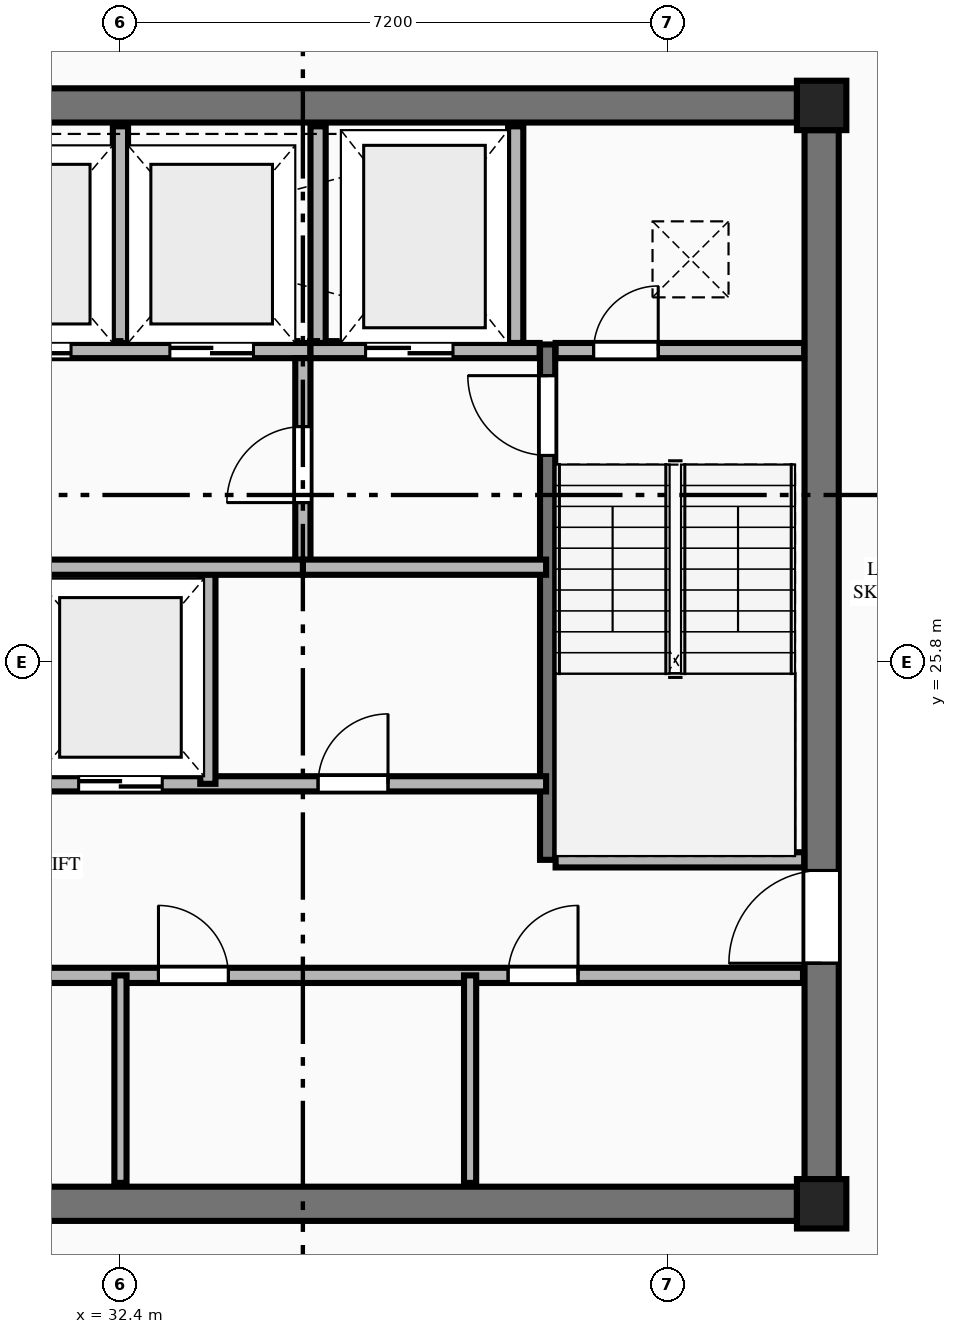
"""IFC4 building model, lengths in metres.
Left out: names, types, materials, properties, quantities, classifications, styles, units other than length and angle.
Written with IfcOpenShell. Run it as: python <this file> out.ifc"""

import sys

from ifc_helpers import new_model, si_unit, direction, frame, frame_2d, origin, origin_2d, place, context, subcontext, project, spatial, rectangle, extrude, element, fill, save


model = new_model("IFC4")
c1 = context("Model", 3, precision=1e-05, world=origin(), true_north=direction((0.0, 1.0)))
c2 = subcontext(c1, "Body", "Model", "MODEL_VIEW")
j1 = project(units=[si_unit("LENGTHUNIT", "METRE"), si_unit("PLANEANGLEUNIT", "RADIAN")], contexts=[c1])
p1 = place(None, origin())
s1 = spatial("IfcSite", under=j1, at=p1, CompositionType="ELEMENT")
p2 = place(p1, origin())
s2 = spatial("IfcBuilding", under=s1, at=p2, CompositionType="ELEMENT")
p3 = place(p2, frame((0.0, 0.0, 245.25)))
s3 = spatial("IfcBuildingStorey", under=s2, at=p3, CompositionType="ELEMENT", Elevation=245.25)
for number, where, z_axis, x_axis in (
    (1, (41.625, 18.675, 0.0), (0.0, 0.0, 1.0), (1.0, 0.0, 0.0)),
    (2, (41.625, 33.125, 0.0), (0.0, 0.0, 1.0), (1.0, 0.0, 0.0)),
):
    element("IfcColumn", number, at=place(p3, frame(where, z_axis=z_axis, x_axis=x_axis)), inside=s3, PredefinedType="COLUMN", context=c2, shape_type="SweptSolid", body=[
        extrude(rectangle(XDim=0.65, YDim=0.65, at=origin_2d()), origin(), (0.0, 0.0, 1.0), 3.65),
    ])
for number, where, z_axis, x_axis in (
    (3, (23.5, 18.675, 0.0), (0.0, 0.0, 1.0), (1.0, 0.0, 0.0)),
    (4, (23.5, 33.125, 0.0), (0.0, 0.0, 1.0), (1.0, 0.0, 0.0)),
):
    element("IfcWall", number, at=place(p3, frame(where, z_axis=z_axis, x_axis=x_axis)), inside=s3, PredefinedType="SHEAR", context=c2, shape_type="SweptSolid", body=[
        extrude(rectangle(XDim=17.8, YDim=0.45, at=frame_2d((8.9, 0.0))), origin(), (0.0, 0.0, 1.0), 3.45),
    ])
p4 = place(p3, frame((41.625, 19.0, 0.0), z_axis=(0.0, 0.0, 1.0), x_axis=(0.0, 1.0, 0.0)))
e5 = element("IfcWall", 5, at=p4, inside=s3, PredefinedType="SHEAR", context=c2, shape_type="SweptSolid", body=[
    extrude(rectangle(XDim=13.8, YDim=0.45, at=frame_2d((6.9, 0.0))), origin(), (0.0, 0.0, 1.0), 3.45),
])
p5 = place(p4, frame((2.84, 0.0, 0.0)))
e6 = element("IfcOpeningElement", 6, at=p5, cuts=e5, PredefinedType="OPENING", context=c2, shape_type="SweptSolid", body=[
    extrude(rectangle(XDim=1.22, YDim=2.25, at=frame_2d((0.61, 1.125))), frame((0.0, 0.235, 0.0), z_axis=(0.0, -1.0, 0.0), x_axis=(1.0, 0.0, 0.0)), (0.0, 0.0, 1.0), 0.47),
])
p6 = place(p3, frame((38.02, 23.2, 0.0), z_axis=(0.0, 0.0, 1.0), x_axis=(0.0, 1.0, 0.0)))
e7 = element("IfcWall", 7, at=p6, inside=s3, PredefinedType="SHEAR", context=c2, shape_type="SweptSolid", body=[
    extrude(rectangle(XDim=6.78, YDim=0.2, at=frame_2d((3.39, 0.0))), origin(), (0.0, 0.0, 1.0), 3.65),
])
p7 = place(p6, frame((5.32, 0.0, 0.0)))
e8 = element("IfcOpeningElement", 8, at=p7, cuts=e7, PredefinedType="OPENING", context=c2, shape_type="SweptSolid", body=[
    extrude(rectangle(XDim=1.05, YDim=2.15, at=frame_2d((0.525, 1.075))), frame((0.0, 0.11, 0.0), z_axis=(0.0, -1.0, 0.0), x_axis=(1.0, 0.0, 0.0)), (0.0, 0.0, 1.0), 0.22),
])
p8 = place(p3, frame((38.125, 23.2, 0.0), z_axis=(0.0, 0.0, 1.0), x_axis=(1.0, 0.0, 0.0)))
e9 = element("IfcWall", 9, at=p8, inside=s3, PredefinedType="PLUMBINGWALL", context=c2, shape_type="SweptSolid", body=[
    extrude(rectangle(XDim=3.27, YDim=0.2, at=frame_2d((1.635, 0.0))), origin(), (0.0, 0.0, 1.0), 3.45),
])
p9 = place(p3, frame((29.9, 29.9, 0.0), z_axis=(0.0, 0.0, 1.0), x_axis=(1.0, 0.0, 0.0)))
e10 = element("IfcWall", 10, at=p9, inside=s3, PredefinedType="PLUMBINGWALL", context=c2, shape_type="SweptSolid", body=[
    extrude(rectangle(XDim=5.0, YDim=0.2, at=frame_2d((2.5, 0.0))), origin(), (0.0, 0.0, 1.0), 3.45),
])
p10 = place(p9, frame((0.75, 0.0, 0.0)))
e11 = element("IfcOpeningElement", 11, at=p10, cuts=e10, PredefinedType="OPENING", context=c2, shape_type="SweptSolid", body=[
    extrude(rectangle(XDim=1.1, YDim=2.2, at=frame_2d((0.55, 1.1))), frame((0.0, 0.11, 0.0), z_axis=(0.0, -1.0, 0.0), x_axis=(1.0, 0.0, 0.0)), (0.0, 0.0, 1.0), 0.22),
])
p11 = place(p9, frame((3.15, 0.0, 0.0)))
e12 = element("IfcOpeningElement", 12, at=p11, cuts=e10, PredefinedType="OPENING", context=c2, shape_type="SweptSolid", body=[
    extrude(rectangle(XDim=1.1, YDim=2.2, at=frame_2d((0.55, 1.1))), frame((0.0, 0.11, 0.0), z_axis=(0.0, -1.0, 0.0), x_axis=(1.0, 0.0, 0.0)), (0.0, 0.0, 1.0), 0.22),
])
p12 = place(p3, frame((34.9, 29.9, 0.0), z_axis=(0.0, 0.0, 1.0), x_axis=(1.0, 0.0, 0.0)))
e13 = element("IfcWall", 13, at=p12, inside=s3, PredefinedType="PLUMBINGWALL", context=c2, shape_type="SweptSolid", body=[
    extrude(rectangle(XDim=3.015, YDim=0.2, at=frame_2d((1.508, 0.0))), origin(), (0.0, 0.0, 1.0), 3.45),
])
p13 = place(p12, frame((0.725, 0.0, 0.0)))
e14 = element("IfcOpeningElement", 14, at=p13, cuts=e13, PredefinedType="OPENING", context=c2, shape_type="SweptSolid", body=[
    extrude(rectangle(XDim=1.15, YDim=2.2, at=frame_2d((0.575, 1.1))), frame((0.0, 0.11, 0.0), z_axis=(0.0, -1.0, 0.0), x_axis=(1.0, 0.0, 0.0)), (0.0, 0.0, 1.0), 0.22),
])
p14 = place(p3, frame((38.125, 29.9, 0.0), z_axis=(0.0, 0.0, 1.0), x_axis=(1.0, 0.0, 0.0)))
e15 = element("IfcWall", 15, at=p14, inside=s3, PredefinedType="PLUMBINGWALL", context=c2, shape_type="SweptSolid", body=[
    extrude(rectangle(XDim=3.27, YDim=0.2, at=frame_2d((1.635, 0.0))), origin(), (0.0, 0.0, 1.0), 3.45),
])
p15 = place(p14, frame((0.5, 0.0, 0.0)))
e16 = element("IfcOpeningElement", 16, at=p15, cuts=e15, PredefinedType="OPENING", context=c2, shape_type="SweptSolid", body=[
    extrude(rectangle(XDim=0.85, YDim=2.05, at=frame_2d((0.425, 1.025))), frame((0.0, 0.11, 0.0), z_axis=(0.0, -1.0, 0.0), x_axis=(1.0, 0.0, 0.0)), (0.0, 0.0, 1.0), 0.22),
])
for number, where, z_axis, x_axis in (
    (17, (32.4, 30.0, 0.0), (0.0, 0.0, 1.0), (0.0, 1.0, 0.0)),
    (18, (35.0, 30.0, 0.0), (0.0, 0.0, 1.0), (0.0, 1.0, 0.0)),
    (19, (37.6, 30.0, 0.0), (0.0, 0.0, 1.0), (0.0, 1.0, 0.0)),
):
    element("IfcWall", number, at=place(p3, frame(where, z_axis=z_axis, x_axis=x_axis)), inside=s3, PredefinedType="PLUMBINGWALL", context=c2, shape_type="SweptSolid", body=[
        extrude(rectangle(XDim=2.85, YDim=0.2, at=frame_2d((1.425, 0.0))), origin(), (0.0, 0.0, 1.0), 3.45),
    ])
p16 = place(p3, frame((34.8, 27.05, 0.0), z_axis=(0.0, 0.0, 1.0), x_axis=(0.0, 1.0, 0.0)))
e20 = element("IfcWall", 20, at=p16, inside=s3, PredefinedType="PLUMBINGWALL", context=c2, shape_type="SweptSolid", body=[
    extrude(rectangle(XDim=2.75, YDim=0.2, at=frame_2d((1.375, 0.0))), origin(), (0.0, 0.0, 1.0), 3.45),
])
p17 = place(p16, frame((0.85, 0.0, 0.0)))
e21 = element("IfcOpeningElement", 21, at=p17, cuts=e20, PredefinedType="OPENING", context=c2, shape_type="SweptSolid", body=[
    extrude(rectangle(XDim=1.0, YDim=2.15, at=frame_2d((0.5, 1.075))), frame((0.0, 0.11, 0.0), z_axis=(0.0, -1.0, 0.0), x_axis=(1.0, 0.0, 0.0)), (0.0, 0.0, 1.0), 0.22),
])
p18 = place(p3, frame((34.8, 27.05, 0.0), z_axis=(0.0, 0.0, 1.0), x_axis=(1.0, 0.0, 0.0)))
e22 = element("IfcWall", 22, at=p18, inside=s3, PredefinedType="PLUMBINGWALL", context=c2, shape_type="SweptSolid", body=[
    extrude(rectangle(XDim=3.2, YDim=0.2, at=frame_2d((1.6, 0.0))), origin(), (0.0, 0.0, 1.0), 3.45),
])
p19 = place(p3, frame((31.2, 24.2, 0.0), z_axis=(0.0, 0.0, 1.0), x_axis=(1.0, 0.0, 0.0)))
e23 = element("IfcWall", 23, at=p19, inside=s3, PredefinedType="PLUMBINGWALL", context=c2, shape_type="SweptSolid", body=[
    extrude(rectangle(XDim=6.8, YDim=0.2, at=frame_2d((3.4, 0.0))), origin(), (0.0, 0.0, 1.0), 3.45),
])
p20 = place(p19, frame((0.65, 0.0, 0.0)))
e24 = element("IfcOpeningElement", 24, at=p20, cuts=e23, PredefinedType="OPENING", context=c2, shape_type="SweptSolid", body=[
    extrude(rectangle(XDim=1.1, YDim=2.2, at=frame_2d((0.55, 1.1))), frame((0.0, 0.11, 0.0), z_axis=(0.0, -1.0, 0.0), x_axis=(1.0, 0.0, 0.0)), (0.0, 0.0, 1.0), 0.22),
])
p21 = place(p19, frame((3.8, 0.0, 0.0)))
e25 = element("IfcOpeningElement", 25, at=p21, cuts=e23, PredefinedType="OPENING", context=c2, shape_type="SweptSolid", body=[
    extrude(rectangle(XDim=0.92, YDim=2.15, at=frame_2d((0.46, 1.075))), frame((0.0, 0.11, 0.0), z_axis=(0.0, -1.0, 0.0), x_axis=(1.0, 0.0, 0.0)), (0.0, 0.0, 1.0), 0.22),
])
p22 = place(p3, frame((33.55, 24.2, 0.0), z_axis=(0.0, 0.0, 1.0), x_axis=(0.0, 1.0, 0.0)))
e26 = element("IfcWall", 26, at=p22, inside=s3, PredefinedType="PLUMBINGWALL", context=c2, shape_type="SweptSolid", body=[
    extrude(rectangle(XDim=2.85, YDim=0.2, at=frame_2d((1.425, 0.0))), origin(), (0.0, 0.0, 1.0), 3.45),
])
p23 = place(p3, frame((31.25, 27.05, 0.0), z_axis=(0.0, 0.0, 1.0), x_axis=(1.0, 0.0, 0.0)))
e27 = element("IfcWall", 27, at=p23, inside=s3, PredefinedType="PLUMBINGWALL", context=c2, shape_type="SweptSolid", body=[
    extrude(rectangle(XDim=3.55, YDim=0.2, at=frame_2d((1.775, 0.0))), origin(), (0.0, 0.0, 1.0), 3.45),
])
p24 = place(p3, frame((23.42, 21.68, 0.0), z_axis=(0.0, 0.0, 1.0), x_axis=(1.0, 0.0, 0.0)))
e28 = element("IfcWall", 28, at=p24, inside=s3, PredefinedType="PLUMBINGWALL", context=c2, shape_type="SweptSolid", body=[
    extrude(rectangle(XDim=17.96, YDim=0.2, at=frame_2d((8.98, 0.0))), origin(), (0.0, 0.0, 1.0), 3.45),
])
p25 = place(p24, frame((0.46, 0.0, 0.0)))
e29 = element("IfcOpeningElement", 29, at=p25, cuts=e28, PredefinedType="OPENING", context=c2, shape_type="SweptSolid", body=[
    extrude(rectangle(XDim=0.92, YDim=2.15, at=frame_2d((0.46, 1.075))), frame((0.0, 0.11, 0.0), z_axis=(0.0, -1.0, 0.0), x_axis=(1.0, 0.0, 0.0)), (0.0, 0.0, 1.0), 0.22),
])
p26 = place(p24, frame((4.78, 0.0, 0.0)))
e30 = element("IfcOpeningElement", 30, at=p26, cuts=e28, PredefinedType="OPENING", context=c2, shape_type="SweptSolid", body=[
    extrude(rectangle(XDim=0.92, YDim=2.15, at=frame_2d((0.46, 1.075))), frame((0.0, 0.11, 0.0), z_axis=(0.0, -1.0, 0.0), x_axis=(1.0, 0.0, 0.0)), (0.0, 0.0, 1.0), 0.22),
])
p27 = place(p24, frame((9.48, 0.0, 0.0)))
e31 = element("IfcOpeningElement", 31, at=p27, cuts=e28, PredefinedType="OPENING", context=c2, shape_type="SweptSolid", body=[
    extrude(rectangle(XDim=0.92, YDim=2.15, at=frame_2d((0.46, 1.075))), frame((0.0, 0.11, 0.0), z_axis=(0.0, -1.0, 0.0), x_axis=(1.0, 0.0, 0.0)), (0.0, 0.0, 1.0), 0.22),
])
p28 = place(p24, frame((14.08, 0.0, 0.0)))
e32 = element("IfcOpeningElement", 32, at=p28, cuts=e28, PredefinedType="OPENING", context=c2, shape_type="SweptSolid", body=[
    extrude(rectangle(XDim=0.92, YDim=2.15, at=frame_2d((0.46, 1.075))), frame((0.0, 0.11, 0.0), z_axis=(0.0, -1.0, 0.0), x_axis=(1.0, 0.0, 0.0)), (0.0, 0.0, 1.0), 0.22),
])
for number, where, z_axis, x_axis in (
    (33, (32.4, 18.95, 0.0), (0.0, 0.0, 1.0), (0.0, 1.0, 0.0)),
    (34, (37.0, 18.95, 0.0), (0.0, 0.0, 1.0), (0.0, 1.0, 0.0)),
):
    element("IfcWall", number, at=place(p3, frame(where, z_axis=z_axis, x_axis=x_axis)), inside=s3, PredefinedType="PARTITIONING", context=c2, shape_type="SweptSolid", body=[
        extrude(rectangle(XDim=2.73, YDim=0.16, at=frame_2d((1.365, 0.0))), origin(), (0.0, 0.0, 1.0), 3.45),
    ])
p29 = place(p5, origin())
e35 = element("IfcDoor", 35, at=p29, inside=s3, OperationType="SINGLE_SWING_LEFT", PredefinedType="DOOR", context=c2, shape_type="SweptSolid", body=[
    extrude(rectangle(XDim=1.22, YDim=2.25, at=frame_2d((0.61, 1.125))), frame((0.0, 0.025, 0.0), z_axis=(0.0, -1.0, 0.0), x_axis=(1.0, 0.0, 0.0)), (0.0, 0.0, 1.0), 0.05),
])
fill(e6, e35)
p30 = place(p7, origin())
e36 = element("IfcDoor", 36, at=p30, inside=s3, OperationType="SINGLE_SWING_RIGHT", PredefinedType="DOOR", context=c2, shape_type="SweptSolid", body=[
    extrude(rectangle(XDim=1.05, YDim=2.15, at=frame_2d((0.525, 1.075))), frame((0.0, 0.025, 0.0), z_axis=(0.0, -1.0, 0.0), x_axis=(1.0, 0.0, 0.0)), (0.0, 0.0, 1.0), 0.05),
])
fill(e8, e36)
p31 = place(p15, origin())
e37 = element("IfcDoor", 37, at=p31, inside=s3, OperationType="SINGLE_SWING_RIGHT", PredefinedType="DOOR", context=c2, shape_type="SweptSolid", body=[
    extrude(rectangle(XDim=0.85, YDim=2.05, at=frame_2d((0.425, 1.025))), frame((0.0, 0.025, 0.0), z_axis=(0.0, -1.0, 0.0), x_axis=(1.0, 0.0, 0.0)), (0.0, 0.0, 1.0), 0.05),
])
fill(e16, e37)
p32 = place(p13, origin())
e38 = element("IfcDoor", 38, at=p32, inside=s3, OperationType="DOUBLE_DOOR_SLIDING", PredefinedType="DOOR", context=c2, shape_type="SweptSolid", body=[
    extrude(rectangle(XDim=1.15, YDim=2.2, at=frame_2d((0.575, 1.1))), frame((0.0, 0.025, 0.0), z_axis=(0.0, -1.0, 0.0), x_axis=(1.0, 0.0, 0.0)), (0.0, 0.0, 1.0), 0.05),
])
fill(e14, e38)
p33 = place(p10, origin())
e39 = element("IfcDoor", 39, at=p33, inside=s3, OperationType="DOUBLE_DOOR_SLIDING", PredefinedType="DOOR", context=c2, shape_type="SweptSolid", body=[
    extrude(rectangle(XDim=1.1, YDim=2.2, at=frame_2d((0.55, 1.1))), frame((0.0, 0.025, 0.0), z_axis=(0.0, -1.0, 0.0), x_axis=(1.0, 0.0, 0.0)), (0.0, 0.0, 1.0), 0.05),
])
fill(e11, e39)
p34 = place(p11, origin())
e40 = element("IfcDoor", 40, at=p34, inside=s3, OperationType="DOUBLE_DOOR_SLIDING", PredefinedType="DOOR", context=c2, shape_type="SweptSolid", body=[
    extrude(rectangle(XDim=1.1, YDim=2.2, at=frame_2d((0.55, 1.1))), frame((0.0, 0.025, 0.0), z_axis=(0.0, -1.0, 0.0), x_axis=(1.0, 0.0, 0.0)), (0.0, 0.0, 1.0), 0.05),
])
fill(e12, e40)
p35 = place(p17, origin())
e41 = element("IfcDoor", 41, at=p35, inside=s3, OperationType="SINGLE_SWING_LEFT", PredefinedType="DOOR", context=c2, shape_type="SweptSolid", body=[
    extrude(rectangle(XDim=1.0, YDim=2.15, at=frame_2d((0.5, 1.075))), frame((0.0, 0.025, 0.0), z_axis=(0.0, -1.0, 0.0), x_axis=(1.0, 0.0, 0.0)), (0.0, 0.0, 1.0), 0.05),
])
fill(e21, e41)
p36 = place(p20, origin())
e42 = element("IfcDoor", 42, at=p36, inside=s3, OperationType="DOUBLE_DOOR_SLIDING", PredefinedType="DOOR", context=c2, shape_type="SweptSolid", body=[
    extrude(rectangle(XDim=1.1, YDim=2.2, at=frame_2d((0.55, 1.1))), frame((0.0, 0.025, 0.0), z_axis=(0.0, -1.0, 0.0), x_axis=(1.0, 0.0, 0.0)), (0.0, 0.0, 1.0), 0.05),
])
fill(e24, e42)
p37 = place(p21, origin())
e43 = element("IfcDoor", 43, at=p37, inside=s3, OperationType="SINGLE_SWING_RIGHT", PredefinedType="DOOR", context=c2, shape_type="SweptSolid", body=[
    extrude(rectangle(XDim=0.92, YDim=2.15, at=frame_2d((0.46, 1.075))), frame((0.0, 0.025, 0.0), z_axis=(0.0, -1.0, 0.0), x_axis=(1.0, 0.0, 0.0)), (0.0, 0.0, 1.0), 0.05),
])
fill(e25, e43)
p38 = place(p27, origin())
e44 = element("IfcDoor", 44, at=p38, inside=s3, OperationType="SINGLE_SWING_LEFT", PredefinedType="DOOR", context=c2, shape_type="SweptSolid", body=[
    extrude(rectangle(XDim=0.92, YDim=2.15, at=frame_2d((0.46, 1.075))), frame((0.0, 0.025, 0.0), z_axis=(0.0, -1.0, 0.0), x_axis=(1.0, 0.0, 0.0)), (0.0, 0.0, 1.0), 0.05),
])
fill(e31, e44)
p39 = place(p28, origin())
e45 = element("IfcDoor", 45, at=p39, inside=s3, OperationType="SINGLE_SWING_RIGHT", PredefinedType="DOOR", context=c2, shape_type="SweptSolid", body=[
    extrude(rectangle(XDim=0.92, YDim=2.15, at=frame_2d((0.46, 1.075))), frame((0.0, 0.025, 0.0), z_axis=(0.0, -1.0, 0.0), x_axis=(1.0, 0.0, 0.0)), (0.0, 0.0, 1.0), 0.05),
])
fill(e32, e45)
save(model, sys.argv[1])
